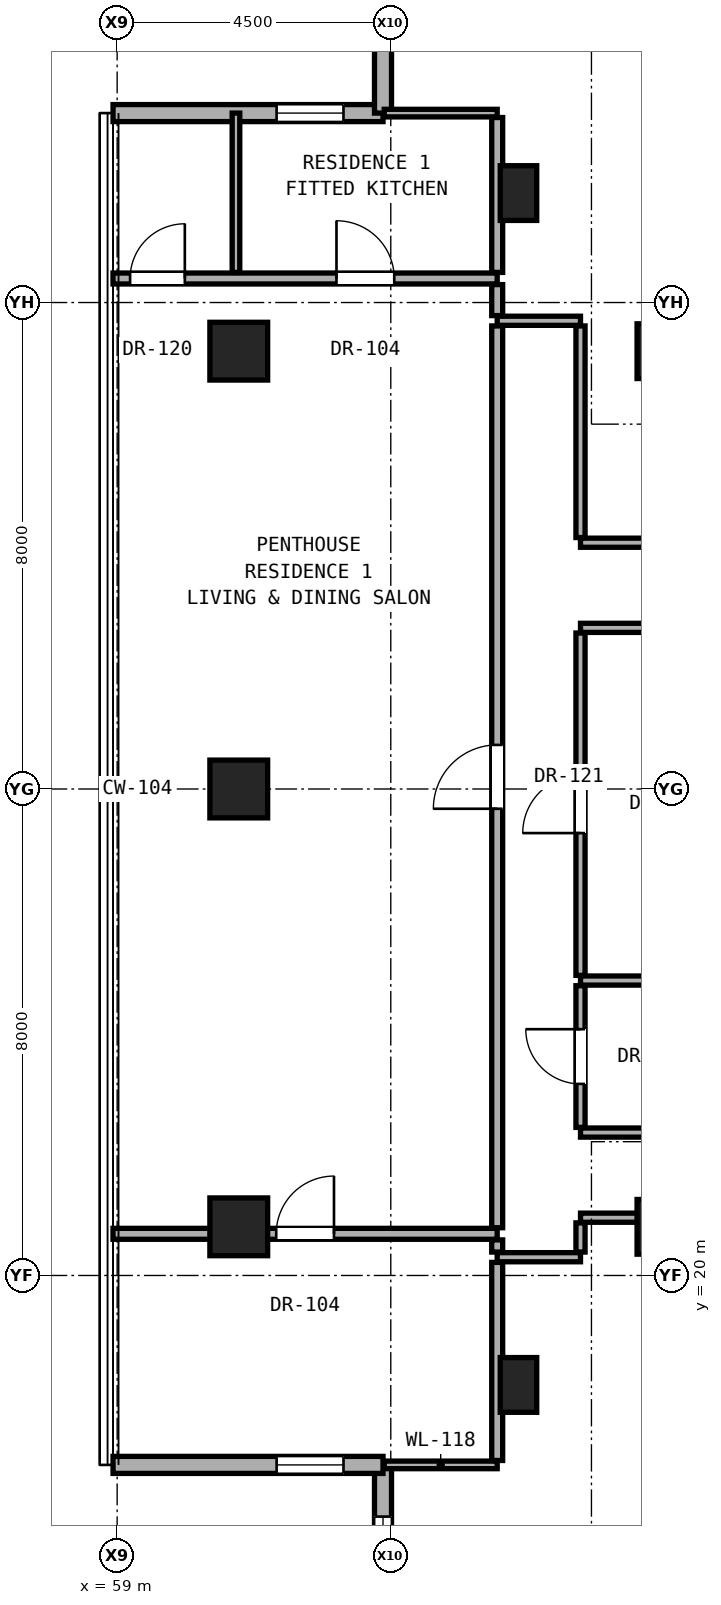
"""IFC4 building model, lengths in metres.
Left out: names, types, materials, properties, quantities, classifications, styles, units other than length and angle.
Written with IfcOpenShell. Run it as: python <this file> out.ifc"""

import sys

from ifc_helpers import new_model, si_unit, direction, frame, frame_2d, origin, origin_2d, place, context, subcontext, project, spatial, rectangle, hollow_rectangle, extrude, element, fill, save


model = new_model("IFC4")
c1 = context("Model", 3, precision=1e-05, world=origin(), true_north=direction((0.0, 1.0)))
c2 = subcontext(c1, "Body", "Model", "MODEL_VIEW")
j1 = project(units=[si_unit("LENGTHUNIT", "METRE"), si_unit("PLANEANGLEUNIT", "RADIAN")], contexts=[c1])
p1 = place(None, origin())
s1 = spatial("IfcSite", under=j1, at=p1, CompositionType="ELEMENT")
p2 = place(p1, origin())
s2 = spatial("IfcBuilding", under=s1, at=p2, CompositionType="ELEMENT")
p3 = place(p2, frame((0.0, 0.0, 199.9)))
s3 = spatial("IfcBuildingStorey", under=s2, at=p3, CompositionType="ELEMENT", Elevation=199.9)
for number, where, z_axis, x_axis in (
    (1, (68.0, 20.8, 0.0), (0.0, 0.0, 1.0), (1.0, 0.0, 0.0)),
    (2, (68.0, 35.2, 0.0), (0.0, 0.0, 1.0), (1.0, 0.0, 0.0)),
):
    element("IfcColumn", number, at=place(p3, frame(where, z_axis=z_axis, x_axis=x_axis)), inside=s3, PredefinedType="COLUMN", context=c2, shape_type="SweptSolid", body=[
        extrude(rectangle(XDim=0.9, YDim=0.9, at=origin_2d()), origin(), (0.0, 0.0, 1.0), 3.25),
    ])
for number, where, z_axis, x_axis in (
    (3, (61.0, 20.8, 0.0), (0.0, 0.0, 1.0), (1.0, 0.0, 0.0)),
    (4, (61.0, 28.0, 0.0), (0.0, 0.0, 1.0), (1.0, 0.0, 0.0)),
    (5, (61.0, 35.2, 0.0), (0.0, 0.0, 1.0), (1.0, 0.0, 0.0)),
):
    element("IfcColumn", number, at=place(p3, frame(where, z_axis=z_axis, x_axis=x_axis)), inside=s3, PredefinedType="COLUMN", context=c2, shape_type="SweptSolid", body=[
        extrude(hollow_rectangle(XDim=0.95, YDim=0.95, WallThickness=0.05, at=origin_2d()), origin(), (0.0, 0.0, 1.0), 3.25),
    ])
for number, where, z_axis, x_axis in (
    (6, (65.6, 18.2, 0.0), (0.0, 0.0, 1.0), (1.0, 0.0, 0.0)),
    (7, (65.6, 37.8, 0.0), (0.0, 0.0, 1.0), (1.0, 0.0, 0.0)),
):
    element("IfcColumn", number, at=place(p3, frame(where, z_axis=z_axis, x_axis=x_axis)), inside=s3, PredefinedType="PILASTER", context=c2, shape_type="SweptSolid", body=[
        extrude(rectangle(XDim=0.6, YDim=0.9, at=origin_2d()), origin(), (0.0, 0.0, 1.0), 3.25),
    ])
p4 = place(p3, frame((63.372, 16.885, 0.0), z_axis=(0.0, 0.0, 1.0), x_axis=(0.0, -1.0, 0.0)))
e8 = element("IfcWall", 8, at=p4, inside=s3, PredefinedType="SOLIDWALL", context=c2, shape_type="SweptSolid", body=[
    extrude(rectangle(XDim=4.44, YDim=0.28, at=frame_2d((2.22, 0.0))), origin(), (0.0, 0.0, 1.0), 3.03),
])
p5 = place(p4, frame((0.85, 0.0, 0.68)))
e9 = element("IfcOpeningElement", 9, at=p5, cuts=e8, PredefinedType="OPENING", context=c2, shape_type="SweptSolid", body=[
    extrude(rectangle(XDim=1.65, YDim=2.2, at=frame_2d((0.825, 1.1))), frame((0.0, 0.15, 0.0), z_axis=(0.0, -1.0, 0.0), x_axis=(1.0, 0.0, 0.0)), (0.0, 0.0, 1.0), 0.3),
])
p6 = place(p3, frame((58.933, 16.885, 0.0), z_axis=(0.0, 0.0, 1.0), x_axis=(1.0, 0.0, 0.0)))
e10 = element("IfcWall", 10, at=p6, inside=s3, PredefinedType="SOLIDWALL", context=c2, shape_type="SweptSolid", body=[
    extrude(rectangle(XDim=4.44, YDim=0.28, at=frame_2d((2.22, 0.0))), origin(), (0.0, 0.0, 1.0), 3.03),
])
p7 = place(p6, frame((2.69, 0.0, 0.85)))
e11 = element("IfcOpeningElement", 11, at=p7, cuts=e10, PredefinedType="OPENING", context=c2, shape_type="SweptSolid", body=[
    extrude(rectangle(XDim=1.1, YDim=2.0, at=frame_2d((0.55, 1.0))), frame((0.0, 0.15, 0.0), z_axis=(0.0, -1.0, 0.0), x_axis=(1.0, 0.0, 0.0)), (0.0, 0.0, 1.0), 0.3),
])
p8 = place(p3, frame((63.372, 39.115, 0.0), z_axis=(0.0, 0.0, 1.0), x_axis=(-1.0, 0.0, 0.0)))
e12 = element("IfcWall", 12, at=p8, inside=s3, PredefinedType="SOLIDWALL", context=c2, shape_type="SweptSolid", body=[
    extrude(rectangle(XDim=4.44, YDim=0.28, at=frame_2d((2.22, 0.0))), origin(), (0.0, 0.0, 1.0), 3.03),
])
p9 = place(p8, frame((0.65, 0.0, 0.85)))
e13 = element("IfcOpeningElement", 13, at=p9, cuts=e12, PredefinedType="OPENING", context=c2, shape_type="SweptSolid", body=[
    extrude(rectangle(XDim=1.1, YDim=2.0, at=frame_2d((0.55, 1.0))), frame((0.0, 0.15, 0.0), z_axis=(0.0, -1.0, 0.0), x_axis=(1.0, 0.0, 0.0)), (0.0, 0.0, 1.0), 0.3),
])
p10 = place(p3, frame((63.372, 43.555, 0.0), z_axis=(0.0, 0.0, 1.0), x_axis=(0.0, -1.0, 0.0)))
e14 = element("IfcWall", 14, at=p10, inside=s3, PredefinedType="SOLIDWALL", context=c2, shape_type="SweptSolid", body=[
    extrude(rectangle(XDim=4.44, YDim=0.28, at=frame_2d((2.22, 0.0))), origin(), (0.0, 0.0, 1.0), 3.03),
])
p11 = place(p3, frame((63.392, 16.885, 0.0), z_axis=(0.0, 0.0, 1.0), x_axis=(1.0, 0.0, 0.0)))
e15 = element("IfcWall", 15, at=p11, inside=s3, PredefinedType="PARTITIONING", context=c2, shape_type="SweptSolid", body=[
    extrude(rectangle(XDim=1.858, YDim=0.125, at=frame_2d((0.929, 0.0))), origin(), (0.0, 0.0, 1.0), 3.05),
])
p12 = place(p3, frame((65.25, 20.3, 0.0), z_axis=(0.0, 0.0, 1.0), x_axis=(1.0, 0.0, 0.0)))
e16 = element("IfcWall", 16, at=p12, inside=s3, PredefinedType="PARTITIONING", context=c2, shape_type="SweptSolid", body=[
    extrude(rectangle(XDim=1.37, YDim=0.15, at=frame_2d((0.685, 0.0))), origin(), (0.0, 0.0, 1.0), 3.05),
])
p13 = place(p3, frame((58.932, 20.685, 0.0), z_axis=(0.0, 0.0, 1.0), x_axis=(1.0, 0.0, 0.0)))
e17 = element("IfcWall", 17, at=p13, inside=s3, PredefinedType="PARTITIONING", context=c2, shape_type="SweptSolid", body=[
    extrude(rectangle(XDim=6.318, YDim=0.18, at=frame_2d((3.159, 0.0))), origin(), (0.0, 0.0, 1.0), 2.442),
])
p14 = place(p13, frame((2.684, 0.0, 0.0)))
e18 = element("IfcOpeningElement", 18, at=p14, cuts=e17, PredefinedType="OPENING", context=c2, shape_type="SweptSolid", body=[
    extrude(rectangle(XDim=0.95, YDim=2.15, at=frame_2d((0.475, 1.075))), frame((0.0, 0.1, 0.0), z_axis=(0.0, -1.0, 0.0), x_axis=(1.0, 0.0, 0.0)), (0.0, 0.0, 1.0), 0.2),
])
p15 = place(p3, frame((66.62, 20.95, 0.0), z_axis=(0.0, 0.0, 1.0), x_axis=(1.0, 0.0, 0.0)))
e19 = element("IfcWall", 19, at=p15, inside=s3, PredefinedType="PARTITIONING", context=c2, shape_type="SweptSolid", body=[
    extrude(rectangle(XDim=1.11, YDim=0.15, at=frame_2d((0.555, 0.0))), origin(), (0.0, 0.0, 1.0), 2.442),
])
p16 = place(p3, frame((66.62, 22.35, 0.0), z_axis=(0.0, 0.0, 1.0), x_axis=(1.0, 0.0, 0.0)))
e20 = element("IfcWall", 20, at=p16, inside=s3, PredefinedType="PARTITIONING", context=c2, shape_type="SweptSolid", body=[
    extrude(rectangle(XDim=10.14, YDim=0.15, at=frame_2d((5.07, 0.0))), origin(), (0.0, 0.0, 1.0), 2.186),
])
p17 = place(p3, frame((66.62, 24.85, 0.0), z_axis=(0.0, 0.0, 1.0), x_axis=(1.0, 0.0, 0.0)))
e21 = element("IfcWall", 21, at=p17, inside=s3, PredefinedType="PARTITIONING", context=c2, shape_type="SweptSolid", body=[
    extrude(rectangle(XDim=3.13, YDim=0.15, at=frame_2d((1.565, 0.0))), origin(), (0.0, 0.0, 1.0), 2.186),
])
p18 = place(p3, frame((66.62, 30.65, 0.0), z_axis=(0.0, 0.0, 1.0), x_axis=(1.0, 0.0, 0.0)))
e22 = element("IfcWall", 22, at=p18, inside=s3, PredefinedType="PARTITIONING", context=c2, shape_type="SweptSolid", body=[
    extrude(rectangle(XDim=10.14, YDim=0.15, at=frame_2d((5.07, 0.0))), origin(), (0.0, 0.0, 1.0), 2.186),
])
p19 = place(p18, frame((6.14, 0.0, 0.0)))
e23 = element("IfcOpeningElement", 23, at=p19, cuts=e22, PredefinedType="OPENING", context=c2, shape_type="SweptSolid", body=[
    extrude(rectangle(XDim=0.95, YDim=2.15, at=frame_2d((0.475, 1.075))), frame((0.0, 0.085, 0.0), z_axis=(0.0, -1.0, 0.0), x_axis=(1.0, 0.0, 0.0)), (0.0, 0.0, 1.0), 0.17),
])
p20 = place(p3, frame((66.62, 32.05, 0.0), z_axis=(0.0, 0.0, 1.0), x_axis=(1.0, 0.0, 0.0)))
e24 = element("IfcWall", 24, at=p20, inside=s3, PredefinedType="PARTITIONING", context=c2, shape_type="SweptSolid", body=[
    extrude(rectangle(XDim=2.18, YDim=0.15, at=frame_2d((1.09, 0.0))), origin(), (0.0, 0.0, 1.0), 2.186),
])
p21 = place(p3, frame((65.25, 35.7, 0.0), z_axis=(0.0, 0.0, 1.0), x_axis=(1.0, 0.0, 0.0)))
e25 = element("IfcWall", 25, at=p21, inside=s3, PredefinedType="PARTITIONING", context=c2, shape_type="SweptSolid", body=[
    extrude(rectangle(XDim=1.37, YDim=0.15, at=frame_2d((0.685, 0.0))), origin(), (0.0, 0.0, 1.0), 3.05),
])
p22 = place(p3, frame((58.932, 36.395, 0.0), z_axis=(0.0, 0.0, 1.0), x_axis=(1.0, 0.0, 0.0)))
e26 = element("IfcWall", 26, at=p22, inside=s3, PredefinedType="PARTITIONING", context=c2, shape_type="SweptSolid", body=[
    extrude(rectangle(XDim=6.318, YDim=0.18, at=frame_2d((3.159, 0.0))), origin(), (0.0, 0.0, 1.0), 2.493),
])
p23 = place(p22, frame((3.675, 0.0, 0.0)))
e27 = element("IfcOpeningElement", 27, at=p23, cuts=e26, PredefinedType="OPENING", context=c2, shape_type="SweptSolid", body=[
    extrude(rectangle(XDim=0.95, YDim=2.15, at=frame_2d((0.475, 1.075))), frame((0.0, 0.1, 0.0), z_axis=(0.0, -1.0, 0.0), x_axis=(1.0, 0.0, 0.0)), (0.0, 0.0, 1.0), 0.2),
])
p24 = place(p22, frame((0.281, 0.0, 0.0)))
e28 = element("IfcOpeningElement", 28, at=p24, cuts=e26, PredefinedType="OPENING", context=c2, shape_type="SweptSolid", body=[
    extrude(rectangle(XDim=0.9, YDim=2.1, at=frame_2d((0.45, 1.05))), frame((0.0, 0.1, 0.0), z_axis=(0.0, -1.0, 0.0), x_axis=(1.0, 0.0, 0.0)), (0.0, 0.0, 1.0), 0.2),
])
p25 = place(p3, frame((63.392, 39.115, 0.0), z_axis=(0.0, 0.0, 1.0), x_axis=(1.0, 0.0, 0.0)))
e29 = element("IfcWall", 29, at=p25, inside=s3, PredefinedType="PARTITIONING", context=c2, shape_type="SweptSolid", body=[
    extrude(rectangle(XDim=1.858, YDim=0.125, at=frame_2d((0.929, 0.0))), origin(), (0.0, 0.0, 1.0), 3.05),
])
p26 = place(p3, frame((60.954, 36.495, 0.0), z_axis=(0.0, 0.0, 1.0), x_axis=(0.0, 1.0, 0.0)))
e30 = element("IfcWall", 30, at=p26, inside=s3, PredefinedType="PARTITIONING", context=c2, shape_type="SweptSolid", body=[
    extrude(rectangle(XDim=2.62, YDim=0.125, at=frame_2d((1.31, 0.0))), origin(), (0.0, 0.0, 1.0), 3.05),
])
p27 = place(p3, frame((65.25, 16.958, 0.0), z_axis=(0.0, 0.0, 1.0), x_axis=(0.0, 1.0, 0.0)))
e31 = element("IfcWall", 31, at=p27, inside=s3, PredefinedType="PARTITIONING", context=c2, shape_type="SweptSolid", body=[
    extrude(rectangle(XDim=3.258, YDim=0.18, at=frame_2d((1.629, 0.0))), origin(), (0.0, 0.0, 1.0), 2.493),
])
p28 = place(p3, frame((65.25, 20.385, 0.0), z_axis=(0.0, 0.0, 1.0), x_axis=(0.0, 1.0, 0.0)))
e32 = element("IfcWall", 32, at=p28, inside=s3, PredefinedType="PARTITIONING", context=c2, shape_type="SweptSolid", body=[
    extrude(rectangle(XDim=0.2, YDim=0.18, at=frame_2d((0.1, 0.0))), origin(), (0.0, 0.0, 1.0), 2.442),
])
p29 = place(p3, frame((65.25, 20.785, 0.0), z_axis=(0.0, 0.0, 1.0), x_axis=(0.0, 1.0, 0.0)))
e33 = element("IfcWall", 33, at=p29, inside=s3, PredefinedType="PARTITIONING", context=c2, shape_type="SweptSolid", body=[
    extrude(rectangle(XDim=14.83, YDim=0.18, at=frame_2d((7.415, 0.0))), origin(), (0.0, 0.0, 1.0), 2.346),
])
p30 = place(p29, frame((6.89, 0.0, 0.0)))
e34 = element("IfcOpeningElement", 34, at=p30, cuts=e33, PredefinedType="OPENING", context=c2, shape_type="SweptSolid", body=[
    extrude(rectangle(XDim=1.05, YDim=2.2, at=frame_2d((0.525, 1.1))), frame((0.0, 0.1, 0.0), z_axis=(0.0, -1.0, 0.0), x_axis=(1.0, 0.0, 0.0)), (0.0, 0.0, 1.0), 0.2),
])
p31 = place(p3, frame((65.25, 35.785, 0.0), z_axis=(0.0, 0.0, 1.0), x_axis=(0.0, 1.0, 0.0)))
e35 = element("IfcWall", 35, at=p31, inside=s3, PredefinedType="PARTITIONING", context=c2, shape_type="SweptSolid", body=[
    extrude(rectangle(XDim=0.51, YDim=0.18, at=frame_2d((0.255, 0.0))), origin(), (0.0, 0.0, 1.0), 3.05),
])
p32 = place(p3, frame((65.25, 36.495, 0.0), z_axis=(0.0, 0.0, 1.0), x_axis=(0.0, 1.0, 0.0)))
e36 = element("IfcWall", 36, at=p32, inside=s3, PredefinedType="PARTITIONING", context=c2, shape_type="SweptSolid", body=[
    extrude(rectangle(XDim=2.547, YDim=0.18, at=frame_2d((1.274, 0.0))), origin(), (0.0, 0.0, 1.0), 2.493),
])
p33 = place(p3, frame((66.62, 20.385, 0.0), z_axis=(0.0, 0.0, 1.0), x_axis=(0.0, 1.0, 0.0)))
e37 = element("IfcWall", 37, at=p33, inside=s3, PredefinedType="PARTITIONING", context=c2, shape_type="SweptSolid", body=[
    extrude(rectangle(XDim=0.48, YDim=0.15, at=frame_2d((0.24, 0.0))), origin(), (0.0, 0.0, 1.0), 2.442),
])
p34 = place(p3, frame((66.62, 22.435, 0.0), z_axis=(0.0, 0.0, 1.0), x_axis=(0.0, 1.0, 0.0)))
e38 = element("IfcWall", 38, at=p34, inside=s3, PredefinedType="PARTITIONING", context=c2, shape_type="SweptSolid", body=[
    extrude(rectangle(XDim=2.33, YDim=0.15, at=frame_2d((1.165, 0.0))), origin(), (0.0, 0.0, 1.0), 3.05),
])
p35 = place(p34, frame((0.715, 0.0, 0.0)))
e39 = element("IfcOpeningElement", 39, at=p35, cuts=e38, PredefinedType="OPENING", context=c2, shape_type="SweptSolid", body=[
    extrude(rectangle(XDim=0.9, YDim=2.1, at=frame_2d((0.45, 1.05))), frame((0.0, 0.085, 0.0), z_axis=(0.0, -1.0, 0.0), x_axis=(1.0, 0.0, 0.0)), (0.0, 0.0, 1.0), 0.17),
])
p36 = place(p3, frame((66.62, 24.935, 0.0), z_axis=(0.0, 0.0, 1.0), x_axis=(0.0, 1.0, 0.0)))
e40 = element("IfcWall", 40, at=p36, inside=s3, PredefinedType="PARTITIONING", context=c2, shape_type="SweptSolid", body=[
    extrude(rectangle(XDim=5.63, YDim=0.15, at=frame_2d((2.815, 0.0))), origin(), (0.0, 0.0, 1.0), 2.346),
])
p37 = place(p36, frame((2.34, 0.0, 0.0)))
e41 = element("IfcOpeningElement", 41, at=p37, cuts=e40, PredefinedType="OPENING", context=c2, shape_type="SweptSolid", body=[
    extrude(rectangle(XDim=0.95, YDim=2.15, at=frame_2d((0.475, 1.075))), frame((0.0, 0.085, 0.0), z_axis=(0.0, -1.0, 0.0), x_axis=(1.0, 0.0, 0.0)), (0.0, 0.0, 1.0), 0.17),
])
p38 = place(p3, frame((66.62, 32.135, 0.0), z_axis=(0.0, 0.0, 1.0), x_axis=(0.0, 1.0, 0.0)))
e42 = element("IfcWall", 42, at=p38, inside=s3, PredefinedType="PARTITIONING", context=c2, shape_type="SweptSolid", body=[
    extrude(rectangle(XDim=3.48, YDim=0.15, at=frame_2d((1.74, 0.0))), origin(), (0.0, 0.0, 1.0), 2.442),
])
p39 = place(p5, origin())
e43 = element("IfcWindow", 43, at=p39, inside=s3, PartitioningType="SINGLE_PANEL", PredefinedType="WINDOW", context=c2, shape_type="SweptSolid", body=[
    extrude(rectangle(XDim=1.65, YDim=2.2, at=frame_2d((0.825, 1.1))), frame((0.0, 0.03, 0.0), z_axis=(0.0, -1.0, 0.0), x_axis=(1.0, 0.0, 0.0)), (0.0, 0.0, 1.0), 0.06),
])
fill(e9, e43)
p40 = place(p7, origin())
e44 = element("IfcWindow", 44, at=p40, inside=s3, PartitioningType="SINGLE_PANEL", PredefinedType="WINDOW", context=c2, shape_type="SweptSolid", body=[
    extrude(rectangle(XDim=1.1, YDim=2.0, at=frame_2d((0.55, 1.0))), frame((0.0, 0.03, 0.0), z_axis=(0.0, -1.0, 0.0), x_axis=(1.0, 0.0, 0.0)), (0.0, 0.0, 1.0), 0.06),
])
fill(e11, e44)
p41 = place(p9, origin())
e45 = element("IfcWindow", 45, at=p41, inside=s3, PartitioningType="SINGLE_PANEL", PredefinedType="WINDOW", context=c2, shape_type="SweptSolid", body=[
    extrude(rectangle(XDim=1.1, YDim=2.0, at=frame_2d((0.55, 1.0))), frame((0.0, 0.03, 0.0), z_axis=(0.0, -1.0, 0.0), x_axis=(1.0, 0.0, 0.0)), (0.0, 0.0, 1.0), 0.06),
])
fill(e13, e45)
p42 = place(p35, origin())
e46 = element("IfcDoor", 46, at=p42, inside=s3, OperationType="SINGLE_SWING_RIGHT", PredefinedType="DOOR", context=c2, shape_type="SweptSolid", body=[
    extrude(rectangle(XDim=0.9, YDim=2.1, at=frame_2d((0.45, 1.05))), frame((0.0, 0.025, 0.0), z_axis=(0.0, -1.0, 0.0), x_axis=(1.0, 0.0, 0.0)), (0.0, 0.0, 1.0), 0.05),
])
fill(e39, e46)
p43 = place(p30, origin())
e47 = element("IfcDoor", 47, at=p43, inside=s3, OperationType="SINGLE_SWING_LEFT", PredefinedType="DOOR", context=c2, shape_type="SweptSolid", body=[
    extrude(rectangle(XDim=1.05, YDim=2.2, at=frame_2d((0.525, 1.1))), frame((0.0, 0.025, 0.0), z_axis=(0.0, -1.0, 0.0), x_axis=(1.0, 0.0, 0.0)), (0.0, 0.0, 1.0), 0.05),
])
fill(e34, e47)
p44 = place(p14, origin())
e48 = element("IfcDoor", 48, at=p44, inside=s3, OperationType="SINGLE_SWING_RIGHT", PredefinedType="DOOR", context=c2, shape_type="SweptSolid", body=[
    extrude(rectangle(XDim=0.95, YDim=2.15, at=frame_2d((0.475, 1.075))), frame((0.0, 0.025, 0.0), z_axis=(0.0, -1.0, 0.0), x_axis=(1.0, 0.0, 0.0)), (0.0, 0.0, 1.0), 0.05),
])
fill(e18, e48)
p45 = place(p23, origin())
e49 = element("IfcDoor", 49, at=p45, inside=s3, OperationType="SINGLE_SWING_LEFT", PredefinedType="DOOR", context=c2, shape_type="SweptSolid", body=[
    extrude(rectangle(XDim=0.95, YDim=2.15, at=frame_2d((0.475, 1.075))), frame((0.0, 0.025, 0.0), z_axis=(0.0, -1.0, 0.0), x_axis=(1.0, 0.0, 0.0)), (0.0, 0.0, 1.0), 0.05),
])
fill(e27, e49)
p46 = place(p24, origin())
e50 = element("IfcDoor", 50, at=p46, inside=s3, OperationType="SINGLE_SWING_RIGHT", PredefinedType="DOOR", context=c2, shape_type="SweptSolid", body=[
    extrude(rectangle(XDim=0.9, YDim=2.1, at=frame_2d((0.45, 1.05))), frame((0.0, 0.025, 0.0), z_axis=(0.0, -1.0, 0.0), x_axis=(1.0, 0.0, 0.0)), (0.0, 0.0, 1.0), 0.05),
])
fill(e28, e50)
p47 = place(p37, origin())
e51 = element("IfcDoor", 51, at=p47, inside=s3, OperationType="SINGLE_SWING_LEFT", PredefinedType="DOOR", context=c2, shape_type="SweptSolid", body=[
    extrude(rectangle(XDim=0.95, YDim=2.15, at=frame_2d((0.475, 1.075))), frame((0.0, 0.025, 0.0), z_axis=(0.0, -1.0, 0.0), x_axis=(1.0, 0.0, 0.0)), (0.0, 0.0, 1.0), 0.05),
])
fill(e41, e51)
save(model, sys.argv[1])
